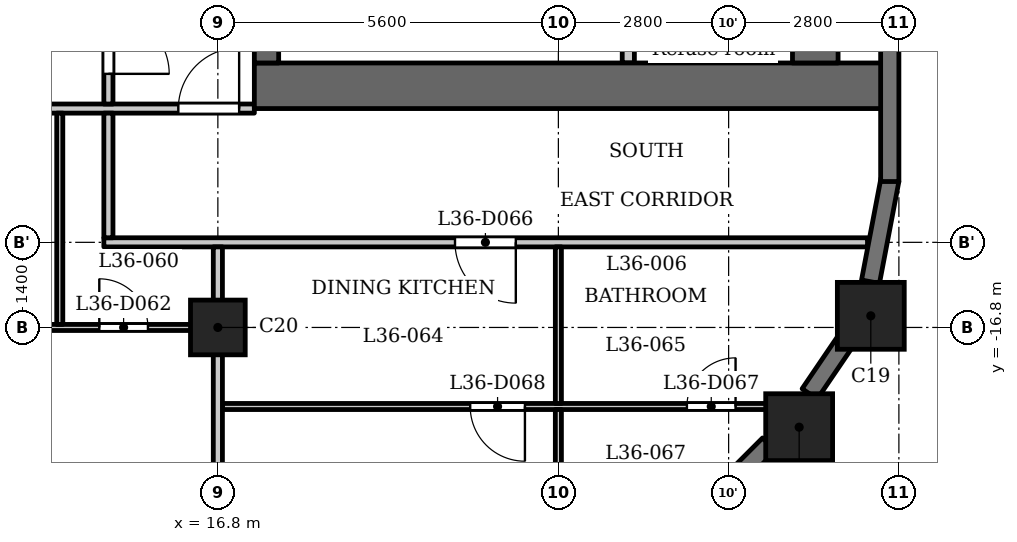
"""IFC4 building model, lengths in metres.
Left out: names, types, materials, properties, quantities, classifications, styles, units other than length and angle.
Written with IfcOpenShell. Run it as: python <this file> out.ifc"""

import sys

from ifc_helpers import new_model, si_unit, direction, frame, frame_2d, origin, origin_2d, place, context, subcontext, project, spatial, rectangle, extrude, element, fill, save


model = new_model("IFC4")
c1 = context("Model", 3, precision=1e-05, world=origin(), true_north=direction((0.0, 1.0)))
c2 = subcontext(c1, "Body", "Model", "MODEL_VIEW")
j1 = project(units=[si_unit("LENGTHUNIT", "METRE"), si_unit("PLANEANGLEUNIT", "RADIAN")], contexts=[c1])
p1 = place(None, origin())
s1 = spatial("IfcSite", under=j1, at=p1, CompositionType="ELEMENT")
p2 = place(p1, origin())
s2 = spatial("IfcBuilding", under=s1, at=p2, CompositionType="ELEMENT")
p3 = place(p2, frame((0.0, 0.0, 143.1)))
s3 = spatial("IfcBuildingStorey", under=s2, at=p3, CompositionType="ELEMENT", Elevation=143.1)
for number, where, z_axis, x_axis in (
    (1, (26.36, -18.44, 0.0), (0.0, 0.0, 1.0), (1.0, 0.0, 0.0)),
    (2, (27.538, -16.609, 0.0), (0.0, 0.0, 1.0), (1.0, 0.0, 0.0)),
):
    element("IfcColumn", number, at=place(p3, frame(where, z_axis=z_axis, x_axis=x_axis)), inside=s3, PredefinedType="COLUMN", context=c2, shape_type="SweptSolid", body=[
        extrude(rectangle(XDim=1.1, YDim=1.1, at=origin_2d()), origin(), (0.0, 0.0, 1.0), 3.5),
    ])
p4 = place(p3, frame((16.8, -16.8, 0.0), z_axis=(0.0, 0.0, 1.0), x_axis=(1.0, 0.0, 0.0)))
e3 = element("IfcColumn", 3, at=p4, inside=s3, PredefinedType="COLUMN", context=c2, shape_type="SweptSolid", body=[
    extrude(rectangle(XDim=0.9, YDim=0.9, at=origin_2d()), origin(), (0.0, 0.0, 1.0), 3.5),
])
p5 = place(p3, frame((23.991, -20.597, 0.0), z_axis=(0.0, 0.0, 1.0), x_axis=(0.707106781187, 0.707106781187, 0.0)))
e4 = element("IfcWall", 4, at=p5, inside=s3, PredefinedType="SOLIDWALL", context=c2, shape_type="SweptSolid", body=[
    extrude(rectangle(XDim=2.65, YDim=0.3, at=frame_2d((1.325, 0.0))), origin(), (0.0, 0.0, 1.0), 2.45),
])
p6 = place(p5, frame((0.725, 0.0, 0.6)))
e5 = element("IfcOpeningElement", 5, at=p6, cuts=e4, PredefinedType="OPENING", context=c2, shape_type="SweptSolid", body=[
    extrude(rectangle(XDim=1.2, YDim=1.55, at=frame_2d((0.6, 0.775))), frame((0.0, 0.16, 0.0), z_axis=(0.0, -1.0, 0.0), x_axis=(1.0, 0.0, 0.0)), (0.0, 0.0, 1.0), 0.32),
])
p7 = place(p3, frame((26.532, -17.893, 0.0), z_axis=(0.0, 0.0, 1.0), x_axis=(0.562105419172, 0.82706559458, 0.0)))
e6 = element("IfcWall", 6, at=p7, inside=s3, PredefinedType="SOLIDWALL", context=c2, shape_type="SweptSolid", body=[
    extrude(rectangle(XDim=1.077, YDim=0.3, at=frame_2d((0.539, 0.0))), origin(), (0.0, 0.0, 1.0), 3.2),
])
p8 = place(p3, frame((27.533, -16.048, 0.0), z_axis=(0.0, 0.0, 1.0), x_axis=(0.187302784601, 0.982302227871, 0.0)))
e7 = element("IfcWall", 7, at=p8, inside=s3, PredefinedType="SOLIDWALL", context=c2, shape_type="SweptSolid", body=[
    extrude(rectangle(XDim=1.706, YDim=0.3, at=frame_2d((0.853, 0.0))), origin(), (0.0, 0.0, 1.0), 2.45),
])
p9 = place(p3, frame((27.85, -14.4, 0.0), z_axis=(0.0, 0.0, 1.0), x_axis=(0.0, 1.0, 0.0)))
e8 = element("IfcWall", 8, at=p9, inside=s3, PredefinedType="SOLIDWALL", context=c2, shape_type="SweptSolid", body=[
    extrude(rectangle(XDim=2.65, YDim=0.3, at=frame_2d((1.325, 0.0))), origin(), (0.0, 0.0, 1.0), 2.45),
])
p10 = place(p3, frame((17.4, -12.825, 0.0), z_axis=(0.0, 0.0, 1.0), x_axis=(1.0, 0.0, 0.0)))
e9 = element("IfcWall", 9, at=p10, inside=s3, PredefinedType="SHEAR", context=c2, shape_type="SweptSolid", body=[
    extrude(rectangle(XDim=10.4, YDim=0.75, at=frame_2d((5.2, 0.0))), origin(), (0.0, 0.0, 1.0), 3.2),
])
p11 = place(p3, frame((17.6, -12.45, 0.0), z_axis=(0.0, 0.0, 1.0), x_axis=(0.0, 1.0, 0.0)))
e10 = element("IfcWall", 10, at=p11, inside=s3, PredefinedType="SHEAR", context=c2, shape_type="SweptSolid", body=[
    extrude(rectangle(XDim=24.9, YDim=0.4, at=frame_2d((12.45, 0.0))), origin(), (0.0, 0.0, 1.0), 3.2),
])
p12 = place(p11, frame((8.65, 0.0, 0.0)))
e11 = element("IfcOpeningElement", 11, at=p12, cuts=e10, PredefinedType="OPENING", context=c2, shape_type="SweptSolid", body=[
    extrude(rectangle(XDim=0.9, YDim=2.1, at=frame_2d((0.45, 1.05))), frame((0.0, 0.21, 0.0), z_axis=(0.0, -1.0, 0.0), x_axis=(1.0, 0.0, 0.0)), (0.0, 0.0, 1.0), 0.42),
])
p13 = place(p11, frame((15.6, 0.0, 0.0)))
e12 = element("IfcOpeningElement", 12, at=p13, cuts=e10, PredefinedType="OPENING", context=c2, shape_type="SweptSolid", body=[
    extrude(rectangle(XDim=1.1, YDim=2.1, at=frame_2d((0.55, 1.05))), frame((0.0, 0.21, 0.0), z_axis=(0.0, -1.0, 0.0), x_axis=(1.0, 0.0, 0.0)), (0.0, 0.0, 1.0), 0.42),
])
p14 = place(p11, frame((18.0, 0.0, 0.0)))
e13 = element("IfcOpeningElement", 13, at=p14, cuts=e10, PredefinedType="OPENING", context=c2, shape_type="SweptSolid", body=[
    extrude(rectangle(XDim=1.1, YDim=2.1, at=frame_2d((0.55, 1.05))), frame((0.0, 0.21, 0.0), z_axis=(0.0, -1.0, 0.0), x_axis=(1.0, 0.0, 0.0)), (0.0, 0.0, 1.0), 0.42),
])
p15 = place(p11, frame((23.025, 0.0, 0.0)))
e14 = element("IfcOpeningElement", 14, at=p15, cuts=e10, PredefinedType="OPENING", context=c2, shape_type="SweptSolid", body=[
    extrude(rectangle(XDim=1.1, YDim=2.1, at=frame_2d((0.55, 1.05))), frame((0.0, 0.21, 0.0), z_axis=(0.0, -1.0, 0.0), x_axis=(1.0, 0.0, 0.0)), (0.0, 0.0, 1.0), 0.42),
])
p16 = place(p11, frame((0.775, 0.0, 0.0)))
e15 = element("IfcOpeningElement", 15, at=p16, cuts=e10, PredefinedType="OPENING", context=c2, shape_type="SweptSolid", body=[
    extrude(rectangle(XDim=1.1, YDim=2.1, at=frame_2d((0.55, 1.05))), frame((0.0, 0.21, 0.0), z_axis=(0.0, -1.0, 0.0), x_axis=(1.0, 0.0, 0.0)), (0.0, 0.0, 1.0), 0.42),
])
p17 = place(p11, frame((12.925, 0.0, 0.0)))
e16 = element("IfcOpeningElement", 16, at=p17, cuts=e10, PredefinedType="OPENING", context=c2, shape_type="SweptSolid", body=[
    extrude(rectangle(XDim=1.8, YDim=2.1, at=frame_2d((0.9, 1.05))), frame((0.0, 0.21, 0.0), z_axis=(0.0, -1.0, 0.0), x_axis=(1.0, 0.0, 0.0)), (0.0, 0.0, 1.0), 0.42),
])
p18 = place(p3, frame((26.625, -12.45, 0.0), z_axis=(0.0, 0.0, 1.0), x_axis=(0.0, 1.0, 0.0)))
e17 = element("IfcWall", 17, at=p18, inside=s3, PredefinedType="SHEAR", context=c2, shape_type="SweptSolid", body=[
    extrude(rectangle(XDim=24.9, YDim=0.75, at=frame_2d((12.45, 0.0))), origin(), (0.0, 0.0, 1.0), 3.2),
])
p19 = place(p3, frame((23.55, -12.45, 0.0), z_axis=(0.0, 0.0, 1.0), x_axis=(0.0, 1.0, 0.0)))
e18 = element("IfcWall", 18, at=p19, inside=s3, PredefinedType="PARTITIONING", context=c2, shape_type="SweptSolid", body=[
    extrude(rectangle(XDim=2.65, YDim=0.2, at=frame_2d((1.325, 0.0))), origin(), (0.0, 0.0, 1.0), 3.2),
])
p20 = place(p19, frame((0.875, 0.0, 0.0)))
e19 = element("IfcOpeningElement", 19, at=p20, cuts=e18, PredefinedType="OPENING", context=c2, shape_type="SweptSolid", body=[
    extrude(rectangle(XDim=0.9, YDim=2.1, at=frame_2d((0.45, 1.05))), frame((0.0, 0.11, 0.0), z_axis=(0.0, -1.0, 0.0), x_axis=(1.0, 0.0, 0.0)), (0.0, 0.0, 1.0), 0.22),
])
p21 = place(p3, frame((16.875, -18.1, 0.0), z_axis=(0.0, 0.0, 1.0), x_axis=(1.0, 0.0, 0.0)))
e20 = element("IfcWall", 20, at=p21, inside=s3, PredefinedType="PARTITIONING", context=c2, shape_type="SweptSolid", body=[
    extrude(rectangle(XDim=9.565, YDim=0.1, at=frame_2d((4.782, 0.0))), origin(), (0.0, 0.0, 1.0), 3.2),
])
p22 = place(p21, frame((7.639, 0.0, 0.0)))
e21 = element("IfcOpeningElement", 21, at=p22, cuts=e20, PredefinedType="OPENING", context=c2, shape_type="SweptSolid", body=[
    extrude(rectangle(XDim=0.8, YDim=2.1, at=frame_2d((0.4, 1.05))), frame((0.0, 0.06, 0.0), z_axis=(0.0, -1.0, 0.0), x_axis=(1.0, 0.0, 0.0)), (0.0, 0.0, 1.0), 0.12),
])
p23 = place(p21, frame((4.075, 0.0, 0.0)))
e22 = element("IfcOpeningElement", 22, at=p23, cuts=e20, PredefinedType="OPENING", context=c2, shape_type="SweptSolid", body=[
    extrude(rectangle(XDim=0.9, YDim=2.1, at=frame_2d((0.45, 1.05))), frame((0.0, 0.06, 0.0), z_axis=(0.0, -1.0, 0.0), x_axis=(1.0, 0.0, 0.0)), (0.0, 0.0, 1.0), 0.12),
])
p24 = place(p3, frame((-16.725, -16.8, 0.0), z_axis=(0.0, 0.0, 1.0), x_axis=(1.0, 0.0, 0.0)))
e23 = element("IfcWall", 23, at=p24, inside=s3, PredefinedType="PARTITIONING", context=c2, shape_type="SweptSolid", body=[
    extrude(rectangle(XDim=33.45, YDim=0.1, at=frame_2d((16.725, 0.0))), origin(), (0.0, 0.0, 1.0), 3.2),
])
p25 = place(p24, frame((0.575, 0.0, 0.0)))
e24 = element("IfcOpeningElement", 24, at=p25, cuts=e23, PredefinedType="OPENING", context=c2, shape_type="SweptSolid", body=[
    extrude(rectangle(XDim=0.8, YDim=2.1, at=frame_2d((0.4, 1.05))), frame((0.0, 0.06, 0.0), z_axis=(0.0, -1.0, 0.0), x_axis=(1.0, 0.0, 0.0)), (0.0, 0.0, 1.0), 0.12),
])
p26 = place(p24, frame((6.175, 0.0, 0.0)))
e25 = element("IfcOpeningElement", 25, at=p26, cuts=e23, PredefinedType="OPENING", context=c2, shape_type="SweptSolid", body=[
    extrude(rectangle(XDim=0.9, YDim=2.1, at=frame_2d((0.45, 1.05))), frame((0.0, 0.06, 0.0), z_axis=(0.0, -1.0, 0.0), x_axis=(1.0, 0.0, 0.0)), (0.0, 0.0, 1.0), 0.12),
])
p27 = place(p24, frame((15.275, 0.0, 0.0)))
e26 = element("IfcOpeningElement", 26, at=p27, cuts=e23, PredefinedType="OPENING", context=c2, shape_type="SweptSolid", body=[
    extrude(rectangle(XDim=0.8, YDim=2.1, at=frame_2d((0.4, 1.05))), frame((0.0, 0.06, 0.0), z_axis=(0.0, -1.0, 0.0), x_axis=(1.0, 0.0, 0.0)), (0.0, 0.0, 1.0), 0.12),
])
p28 = place(p24, frame((11.775, 0.0, 0.0)))
e27 = element("IfcOpeningElement", 27, at=p28, cuts=e23, PredefinedType="OPENING", context=c2, shape_type="SweptSolid", body=[
    extrude(rectangle(XDim=0.9, YDim=2.1, at=frame_2d((0.45, 1.05))), frame((0.0, 0.06, 0.0), z_axis=(0.0, -1.0, 0.0), x_axis=(1.0, 0.0, 0.0)), (0.0, 0.0, 1.0), 0.12),
])
p29 = place(p24, frame((17.275, 0.0, 0.0)))
e28 = element("IfcOpeningElement", 28, at=p29, cuts=e23, PredefinedType="OPENING", context=c2, shape_type="SweptSolid", body=[
    extrude(rectangle(XDim=0.8, YDim=2.1, at=frame_2d((0.4, 1.05))), frame((0.0, 0.06, 0.0), z_axis=(0.0, -1.0, 0.0), x_axis=(1.0, 0.0, 0.0)), (0.0, 0.0, 1.0), 0.12),
])
p30 = place(p24, frame((20.775, 0.0, 0.0)))
e29 = element("IfcOpeningElement", 29, at=p30, cuts=e23, PredefinedType="OPENING", context=c2, shape_type="SweptSolid", body=[
    extrude(rectangle(XDim=0.9, YDim=2.1, at=frame_2d((0.45, 1.05))), frame((0.0, 0.06, 0.0), z_axis=(0.0, -1.0, 0.0), x_axis=(1.0, 0.0, 0.0)), (0.0, 0.0, 1.0), 0.12),
])
p31 = place(p24, frame((31.575, 0.0, 0.0)))
e30 = element("IfcOpeningElement", 30, at=p31, cuts=e23, PredefinedType="OPENING", context=c2, shape_type="SweptSolid", body=[
    extrude(rectangle(XDim=0.8, YDim=2.1, at=frame_2d((0.4, 1.05))), frame((0.0, 0.06, 0.0), z_axis=(0.0, -1.0, 0.0), x_axis=(1.0, 0.0, 0.0)), (0.0, 0.0, 1.0), 0.12),
])
p32 = place(p24, frame((28.575, 0.0, 0.0)))
e31 = element("IfcOpeningElement", 31, at=p32, cuts=e23, PredefinedType="OPENING", context=c2, shape_type="SweptSolid", body=[
    extrude(rectangle(XDim=0.9, YDim=2.1, at=frame_2d((0.45, 1.05))), frame((0.0, 0.06, 0.0), z_axis=(0.0, -1.0, 0.0), x_axis=(1.0, 0.0, 0.0)), (0.0, 0.0, 1.0), 0.12),
])
p33 = place(p24, frame((23.725, 0.0, 0.0)))
e32 = element("IfcOpeningElement", 32, at=p33, cuts=e23, PredefinedType="OPENING", context=c2, shape_type="SweptSolid", body=[
    extrude(rectangle(XDim=0.9, YDim=2.1, at=frame_2d((0.45, 1.05))), frame((0.0, 0.06, 0.0), z_axis=(0.0, -1.0, 0.0), x_axis=(1.0, 0.0, 0.0)), (0.0, 0.0, 1.0), 0.12),
])
p34 = place(p24, frame((26.225, 0.0, 0.0)))
e33 = element("IfcOpeningElement", 33, at=p34, cuts=e23, PredefinedType="OPENING", context=c2, shape_type="SweptSolid", body=[
    extrude(rectangle(XDim=0.9, YDim=2.1, at=frame_2d((0.45, 1.05))), frame((0.0, 0.06, 0.0), z_axis=(0.0, -1.0, 0.0), x_axis=(1.0, 0.0, 0.0)), (0.0, 0.0, 1.0), 0.12),
])
p35 = place(p3, frame((14.925, -15.4, 0.0), z_axis=(0.0, 0.0, 1.0), x_axis=(1.0, 0.0, 0.0)))
e34 = element("IfcWall", 34, at=p35, inside=s3, PredefinedType="PARTITIONING", context=c2, shape_type="SweptSolid", body=[
    extrude(rectangle(XDim=12.559, YDim=0.15, at=frame_2d((6.279, 0.0))), origin(), (0.0, 0.0, 1.0), 3.2),
])
p36 = place(p35, frame((5.775, 0.0, 0.0)))
e35 = element("IfcOpeningElement", 35, at=p36, cuts=e34, PredefinedType="OPENING", context=c2, shape_type="SweptSolid", body=[
    extrude(rectangle(XDim=1.0, YDim=2.1, at=frame_2d((0.5, 1.05))), frame((0.0, 0.085, 0.0), z_axis=(0.0, -1.0, 0.0), x_axis=(1.0, 0.0, 0.0)), (0.0, 0.0, 1.0), 0.17),
])
p37 = place(p3, frame((-17.4, -13.2, 0.0), z_axis=(0.0, 0.0, 1.0), x_axis=(1.0, 0.0, 0.0)))
e36 = element("IfcWall", 36, at=p37, inside=s3, PredefinedType="PARTITIONING", context=c2, shape_type="SweptSolid", body=[
    extrude(rectangle(XDim=34.8, YDim=0.15, at=frame_2d((17.4, 0.0))), origin(), (0.0, 0.0, 1.0), 3.2),
])
p38 = place(p37, frame((0.15, 0.0, 0.0)))
e37 = element("IfcOpeningElement", 37, at=p38, cuts=e36, PredefinedType="OPENING", context=c2, shape_type="SweptSolid", body=[
    extrude(rectangle(XDim=1.0, YDim=2.1, at=frame_2d((0.5, 1.05))), frame((0.0, 0.085, 0.0), z_axis=(0.0, -1.0, 0.0), x_axis=(1.0, 0.0, 0.0)), (0.0, 0.0, 1.0), 0.17),
])
p39 = place(p37, frame((33.55, 0.0, 0.0)))
e38 = element("IfcOpeningElement", 38, at=p39, cuts=e36, PredefinedType="OPENING", context=c2, shape_type="SweptSolid", body=[
    extrude(rectangle(XDim=1.0, YDim=2.1, at=frame_2d((0.5, 1.05))), frame((0.0, 0.085, 0.0), z_axis=(0.0, -1.0, 0.0), x_axis=(1.0, 0.0, 0.0)), (0.0, 0.0, 1.0), 0.17),
])
p40 = place(p37, frame((6.85, 0.0, 0.0)))
e39 = element("IfcOpeningElement", 39, at=p40, cuts=e36, PredefinedType="OPENING", context=c2, shape_type="SweptSolid", body=[
    extrude(rectangle(XDim=1.0, YDim=2.1, at=frame_2d((0.5, 1.05))), frame((0.0, 0.085, 0.0), z_axis=(0.0, -1.0, 0.0), x_axis=(1.0, 0.0, 0.0)), (0.0, 0.0, 1.0), 0.17),
])
p41 = place(p37, frame((12.45, 0.0, 0.0)))
e40 = element("IfcOpeningElement", 40, at=p41, cuts=e36, PredefinedType="OPENING", context=c2, shape_type="SweptSolid", body=[
    extrude(rectangle(XDim=1.0, YDim=2.1, at=frame_2d((0.5, 1.05))), frame((0.0, 0.085, 0.0), z_axis=(0.0, -1.0, 0.0), x_axis=(1.0, 0.0, 0.0)), (0.0, 0.0, 1.0), 0.17),
])
p42 = place(p37, frame((21.3, 0.0, 0.0)))
e41 = element("IfcOpeningElement", 41, at=p42, cuts=e36, PredefinedType="OPENING", context=c2, shape_type="SweptSolid", body=[
    extrude(rectangle(XDim=1.0, YDim=2.1, at=frame_2d((0.5, 1.05))), frame((0.0, 0.085, 0.0), z_axis=(0.0, -1.0, 0.0), x_axis=(1.0, 0.0, 0.0)), (0.0, 0.0, 1.0), 0.17),
])
p43 = place(p37, frame((26.9, 0.0, 0.0)))
e42 = element("IfcOpeningElement", 42, at=p43, cuts=e36, PredefinedType="OPENING", context=c2, shape_type="SweptSolid", body=[
    extrude(rectangle(XDim=1.0, YDim=2.1, at=frame_2d((0.5, 1.05))), frame((0.0, 0.085, 0.0), z_axis=(0.0, -1.0, 0.0), x_axis=(1.0, 0.0, 0.0)), (0.0, 0.0, 1.0), 0.17),
])
p44 = place(p3, frame((14.2, -16.75, 0.0), z_axis=(0.0, 0.0, 1.0), x_axis=(0.0, 1.0, 0.0)))
e43 = element("IfcWall", 43, at=p44, inside=s3, PredefinedType="PARTITIONING", context=c2, shape_type="SweptSolid", body=[
    extrude(rectangle(XDim=3.475, YDim=0.1, at=frame_2d((1.738, 0.0))), origin(), (0.0, 0.0, 1.0), 3.2),
])
p45 = place(p3, frame((15.0, -15.325, 0.0), z_axis=(0.0, 0.0, 1.0), x_axis=(0.0, 1.0, 0.0)))
e44 = element("IfcWall", 44, at=p45, inside=s3, PredefinedType="PARTITIONING", context=c2, shape_type="SweptSolid", body=[
    extrude(rectangle(XDim=2.05, YDim=0.15, at=frame_2d((1.025, 0.0))), origin(), (0.0, 0.0, 1.0), 3.2),
])
p46 = place(p3, frame((15.0, -13.125, 0.0), z_axis=(0.0, 0.0, 1.0), x_axis=(0.0, 1.0, 0.0)))
e45 = element("IfcWall", 45, at=p46, inside=s3, PredefinedType="PARTITIONING", context=c2, shape_type="SweptSolid", body=[
    extrude(rectangle(XDim=6.356, YDim=0.15, at=frame_2d((3.178, 0.0))), origin(), (0.0, 0.0, 1.0), 3.2),
])
p47 = place(p46, frame((0.496, 0.0, 0.0)))
e46 = element("IfcOpeningElement", 46, at=p47, cuts=e45, PredefinedType="OPENING", context=c2, shape_type="SweptSolid", body=[
    extrude(rectangle(XDim=1.0, YDim=2.1, at=frame_2d((0.5, 1.05))), frame((0.0, 0.085, 0.0), z_axis=(0.0, -1.0, 0.0), x_axis=(1.0, 0.0, 0.0)), (0.0, 0.0, 1.0), 0.17),
])
p48 = place(p3, frame((16.8, -22.93, 0.0), z_axis=(0.0, 0.0, 1.0), x_axis=(0.0, 1.0, 0.0)))
e47 = element("IfcWall", 47, at=p48, inside=s3, PredefinedType="PARTITIONING", context=c2, shape_type="SweptSolid", body=[
    extrude(rectangle(XDim=7.455, YDim=0.15, at=frame_2d((3.728, 0.0))), origin(), (0.0, 0.0, 1.0), 3.2),
])
p49 = place(p3, frame((22.4, -21.72, 0.0), z_axis=(0.0, 0.0, 1.0), x_axis=(0.0, 1.0, 0.0)))
e48 = element("IfcWall", 48, at=p49, inside=s3, PredefinedType="PARTITIONING", context=c2, shape_type="SweptSolid", body=[
    extrude(rectangle(XDim=3.57, YDim=0.1, at=frame_2d((1.785, 0.0))), origin(), (0.0, 0.0, 1.0), 3.2),
])
p50 = place(p49, frame((0.872, 0.0, 0.0)))
e49 = element("IfcOpeningElement", 49, at=p50, cuts=e48, PredefinedType="OPENING", context=c2, shape_type="SweptSolid", body=[
    extrude(rectangle(XDim=0.9, YDim=2.1, at=frame_2d((0.45, 1.05))), frame((0.0, 0.06, 0.0), z_axis=(0.0, -1.0, 0.0), x_axis=(1.0, 0.0, 0.0)), (0.0, 0.0, 1.0), 0.12),
])
p51 = place(p3, frame((22.4, -18.05, 0.0), z_axis=(0.0, 0.0, 1.0), x_axis=(0.0, 1.0, 0.0)))
e50 = element("IfcWall", 50, at=p51, inside=s3, PredefinedType="PARTITIONING", context=c2, shape_type="SweptSolid", body=[
    extrude(rectangle(XDim=2.575, YDim=0.1, at=frame_2d((1.288, 0.0))), origin(), (0.0, 0.0, 1.0), 3.2),
])
p52 = place(p47, origin())
e51 = element("IfcDoor", 51, at=p52, inside=s3, OperationType="SINGLE_SWING_LEFT", PredefinedType="DOOR", context=c2, shape_type="SweptSolid", body=[
    extrude(rectangle(XDim=1.0, YDim=2.1, at=frame_2d((0.5, 1.05))), frame((0.0, 0.025, 0.0), z_axis=(0.0, -1.0, 0.0), x_axis=(1.0, 0.0, 0.0)), (0.0, 0.0, 1.0), 0.05),
])
fill(e46, e51)
p53 = place(p39, origin())
e52 = element("IfcDoor", 52, at=p53, inside=s3, OperationType="SINGLE_SWING_LEFT", PredefinedType="DOOR", context=c2, shape_type="SweptSolid", body=[
    extrude(rectangle(XDim=1.0, YDim=2.1, at=frame_2d((0.5, 1.05))), frame((0.0, 0.025, 0.0), z_axis=(0.0, -1.0, 0.0), x_axis=(1.0, 0.0, 0.0)), (0.0, 0.0, 1.0), 0.05),
])
fill(e38, e52)
p54 = place(p31, origin())
e53 = element("IfcDoor", 53, at=p54, inside=s3, OperationType="SINGLE_SWING_RIGHT", PredefinedType="DOOR", context=c2, shape_type="SweptSolid", body=[
    extrude(rectangle(XDim=0.8, YDim=2.1, at=frame_2d((0.4, 1.05))), frame((0.0, 0.025, 0.0), z_axis=(0.0, -1.0, 0.0), x_axis=(1.0, 0.0, 0.0)), (0.0, 0.0, 1.0), 0.05),
])
fill(e30, e53)
p55 = place(p36, origin())
e54 = element("IfcDoor", 54, at=p55, inside=s3, OperationType="SINGLE_SWING_RIGHT", PredefinedType="DOOR", context=c2, shape_type="SweptSolid", body=[
    extrude(rectangle(XDim=1.0, YDim=2.1, at=frame_2d((0.5, 1.05))), frame((0.0, 0.025, 0.0), z_axis=(0.0, -1.0, 0.0), x_axis=(1.0, 0.0, 0.0)), (0.0, 0.0, 1.0), 0.05),
])
fill(e35, e54)
p56 = place(p22, origin())
e55 = element("IfcDoor", 55, at=p56, inside=s3, OperationType="SINGLE_SWING_LEFT", PredefinedType="DOOR", context=c2, shape_type="SweptSolid", body=[
    extrude(rectangle(XDim=0.8, YDim=2.1, at=frame_2d((0.4, 1.05))), frame((0.0, 0.025, 0.0), z_axis=(0.0, -1.0, 0.0), x_axis=(1.0, 0.0, 0.0)), (0.0, 0.0, 1.0), 0.05),
])
fill(e21, e55)
p57 = place(p23, origin())
e56 = element("IfcDoor", 56, at=p57, inside=s3, OperationType="SINGLE_SWING_RIGHT", PredefinedType="DOOR", context=c2, shape_type="SweptSolid", body=[
    extrude(rectangle(XDim=0.9, YDim=2.1, at=frame_2d((0.45, 1.05))), frame((0.0, 0.025, 0.0), z_axis=(0.0, -1.0, 0.0), x_axis=(1.0, 0.0, 0.0)), (0.0, 0.0, 1.0), 0.05),
])
fill(e22, e56)
save(model, sys.argv[1])
